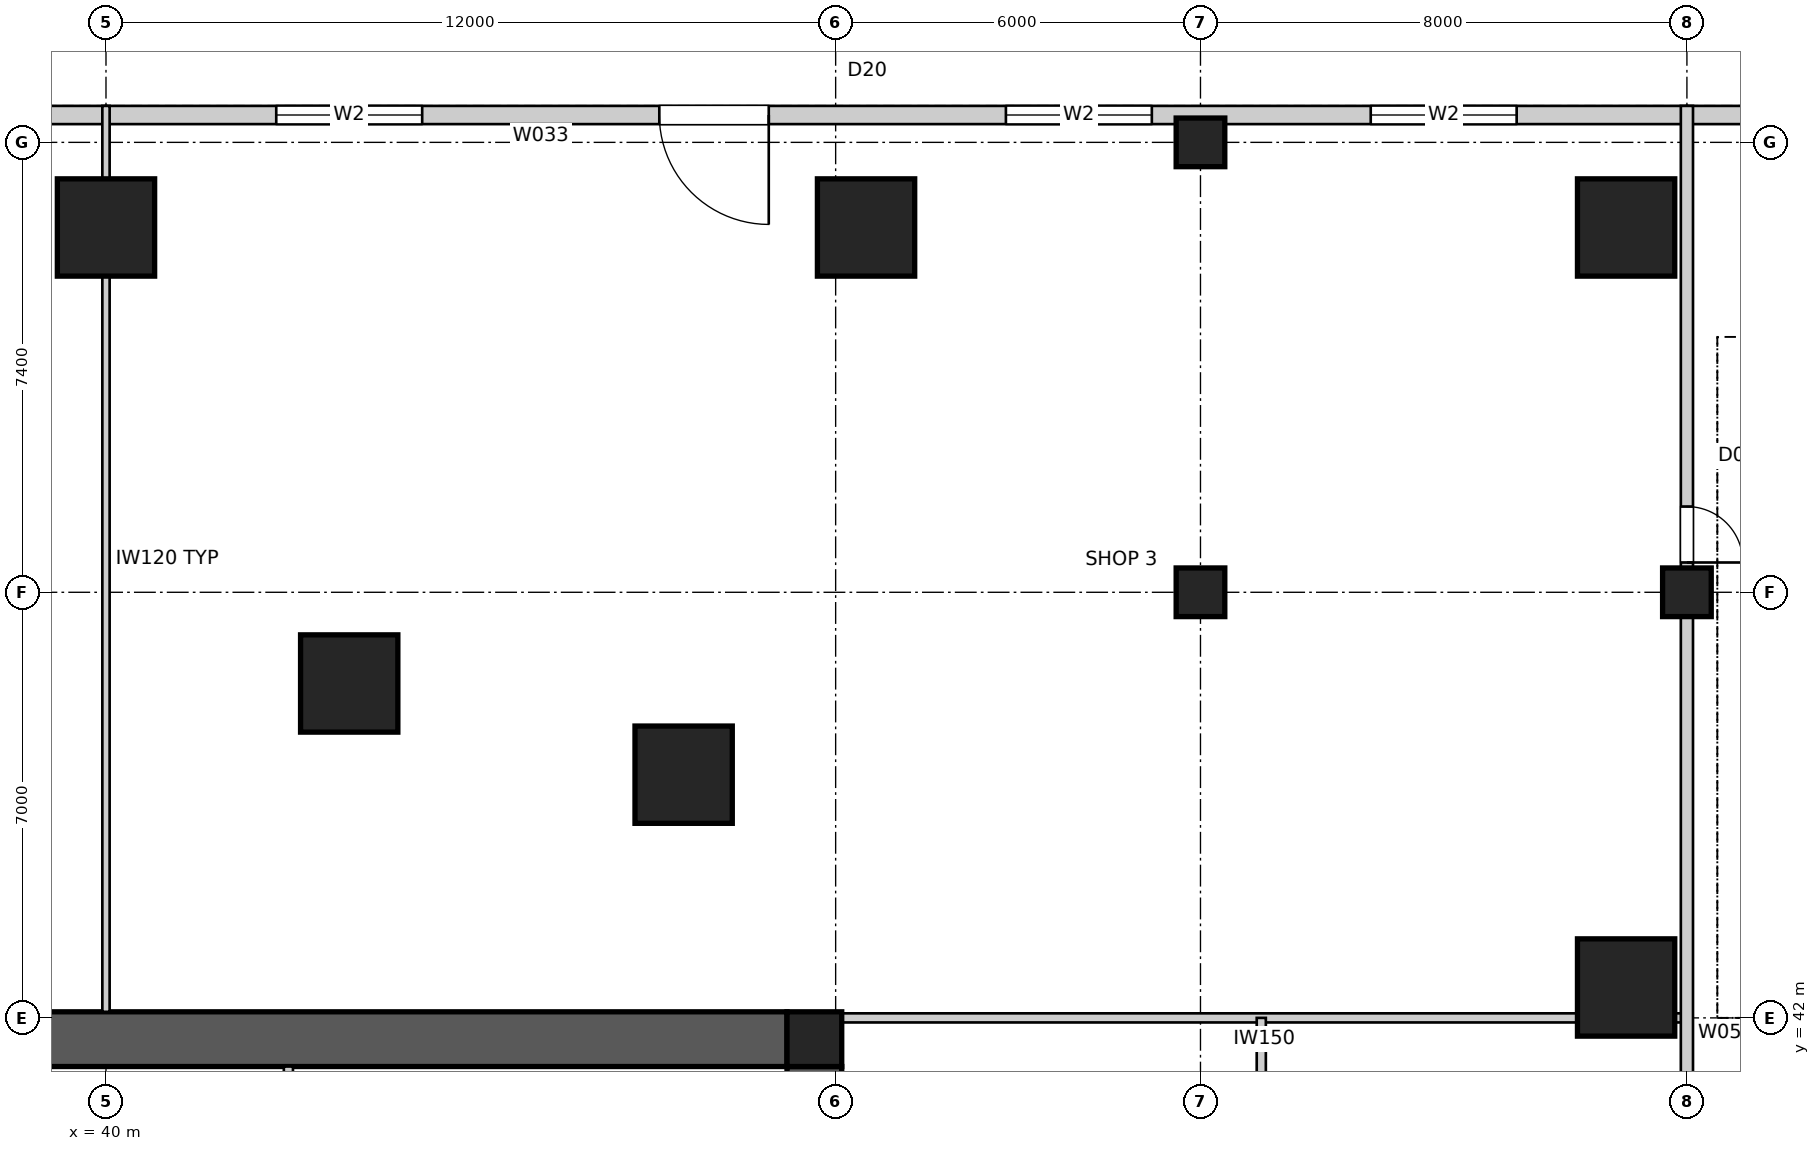
"""IFC4 building model, lengths in metres.
Left out: names, types, materials, properties, quantities, classifications, styles, units other than length and angle.
Written with IfcOpenShell. Run it as: python <this file> out.ifc"""

import sys

from ifc_helpers import new_model, si_unit, direction, frame, frame_2d, origin, origin_2d, place, context, subcontext, project, spatial, polyline, rectangle, outline, extrude, element, fill, save


model = new_model("IFC4")
c1 = context("Model", 3, precision=1e-05, world=origin(), true_north=direction((0.0, 1.0)))
c2 = subcontext(c1, "Body", "Model", "MODEL_VIEW")
j1 = project(units=[si_unit("LENGTHUNIT", "METRE"), si_unit("PLANEANGLEUNIT", "RADIAN")], contexts=[c1])
p1 = place(None, origin())
s1 = spatial("IfcSite", under=j1, at=p1, CompositionType="ELEMENT")
p2 = place(p1, origin())
s2 = spatial("IfcBuilding", under=s1, at=p2, CompositionType="ELEMENT")
p3 = place(p2, origin())
s3 = spatial("IfcBuildingStorey", under=s2, at=p3, CompositionType="ELEMENT", Elevation=0.0)
p4 = place(p3, frame((28.8, 41.65, 0.0), z_axis=(0.0, 0.0, 1.0), x_axis=(1.0, 0.0, 0.0)))
e1 = element("IfcWall", 1, at=p4, inside=s3, PredefinedType="SHEAR", context=c2, shape_type="SweptSolid", body=[
    extrude(outline(polyline([(0.0, -0.45), (22.4, -0.45), (22.4, -0.025), (22.85, -0.025), (22.85, 0.025), (22.4, 0.025), (22.4, 0.45), (0.0, 0.45), (0.0, 0.025), (-0.45, 0.025), (-0.45, -0.025), (0.0, -0.025), (0.0, -0.45)])), origin(), (0.0, 0.0, 1.0), 6.0),
])
p5 = place(p3, frame((51.65, 18.8, 0.0), z_axis=(0.0, 0.0, 1.0), x_axis=(0.0, 1.0, 0.0)))
e2 = element("IfcWall", 2, at=p5, inside=s3, PredefinedType="SHEAR", context=c2, shape_type="SweptSolid", body=[
    extrude(outline(polyline([(0.0, -0.45), (22.4, -0.45), (22.4, -0.025), (22.85, -0.025), (22.85, 0.025), (22.4, 0.025), (22.4, 0.45), (0.0, 0.45), (0.0, 0.025), (-0.45, 0.025), (-0.45, -0.025), (0.0, -0.025), (0.0, -0.45)])), origin(), (0.0, 0.0, 1.0), 6.0),
])
p6 = place(p5, frame((11.14, 0.0, 0.0)))
e3 = element("IfcOpeningElement", 3, at=p6, cuts=e2, PredefinedType="OPENING", context=c2, shape_type="SweptSolid", body=[
    extrude(rectangle(XDim=1.02, YDim=2.4, at=frame_2d((0.51, 1.2))), frame((0.0, 0.46, 0.0), z_axis=(0.0, -1.0, 0.0), x_axis=(1.0, 0.0, 0.0)), (0.0, 0.0, 1.0), 0.92),
])
p7 = place(p3, frame((51.65, 41.65, 0.0), z_axis=(0.0, 0.0, 1.0), x_axis=(1.0, 0.0, 0.0)))
e4 = element("IfcColumn", 4, at=p7, inside=s3, PredefinedType="COLUMN", context=c2, shape_type="SweptSolid", body=[
    extrude(rectangle(XDim=0.9, YDim=0.9, at=origin_2d()), origin(), (0.0, 0.0, 1.0), 6.0),
])
for number, where, z_axis, x_axis in (
    (5, (65.0, 42.5, 0.0), (0.0, 0.0, 1.0), (1.0, 0.0, 0.0)),
    (6, (65.0, 55.0, 0.0), (0.0, 0.0, 1.0), (1.0, 0.0, 0.0)),
    (7, (52.5, 55.0, 0.0), (0.0, 0.0, 1.0), (1.0, 0.0, 0.0)),
    (8, (40.0, 55.0, 0.0), (0.0, 0.0, 1.0), (1.0, 0.0, 0.0)),
):
    element("IfcColumn", number, at=place(p3, frame(where, z_axis=z_axis, x_axis=x_axis)), inside=s3, PredefinedType="COLUMN", context=c2, shape_type="SweptSolid", body=[
        extrude(rectangle(XDim=1.6, YDim=1.6, at=origin_2d()), origin(), (0.0, 0.0, 1.0), 6.0),
    ])
for number, where, z_axis, x_axis in (
    (9, (58.0, 49.0, 0.0), (0.0, 0.0, 1.0), (1.0, 0.0, 0.0)),
    (10, (58.0, 56.4, 0.0), (0.0, 0.0, 1.0), (1.0, 0.0, 0.0)),
    (11, (66.0, 49.0, 0.0), (0.0, 0.0, 1.0), (1.0, 0.0, 0.0)),
):
    element("IfcColumn", number, at=place(p3, frame(where, z_axis=z_axis, x_axis=x_axis)), inside=s3, PredefinedType="COLUMN", context=c2, shape_type="SweptSolid", body=[
        extrude(rectangle(XDim=0.8, YDim=0.8, at=origin_2d()), origin(), (0.0, 0.0, 1.0), 6.0),
    ])
for number, where, z_axis, x_axis in (
    (12, (49.5, 46.0, 0.0), (0.0, 0.0, 1.0), (1.0, 0.0, 0.0)),
    (13, (44.0, 47.5, 0.0), (0.0, 0.0, 1.0), (1.0, 0.0, 0.0)),
):
    element("IfcColumn", number, at=place(p3, frame(where, z_axis=z_axis, x_axis=x_axis)), inside=s3, PredefinedType="COLUMN", context=c2, shape_type="SweptSolid", body=[
        extrude(rectangle(XDim=1.6, YDim=1.6, at=origin_2d()), origin(), (0.0, 0.0, 1.0), 6.0),
    ])
p8 = place(p3, frame((78.0, 56.85, 0.0), z_axis=(0.0, 0.0, 1.0), x_axis=(-1.0, 0.0, 0.0)))
e14 = element("IfcWall", 14, at=p8, inside=s3, PredefinedType="SOLIDWALL", context=c2, shape_type="SweptSolid", body=[
    extrude(rectangle(XDim=12.0, YDim=0.3, at=frame_2d((6.0, 0.0))), origin(), (0.0, 0.0, 1.0), 5.65),
])
p9 = place(p8, frame((3.0, 0.0, 0.0)))
e15 = element("IfcOpeningElement", 15, at=p9, cuts=e14, PredefinedType="OPENING", context=c2, shape_type="SweptSolid", body=[
    extrude(rectangle(XDim=6.0, YDim=4.5, at=frame_2d((3.0, 2.25))), frame((0.0, 0.16, 0.0), z_axis=(0.0, -1.0, 0.0), x_axis=(1.0, 0.0, 0.0)), (0.0, 0.0, 1.0), 0.32),
])
p10 = place(p3, frame((66.0, 56.85, 0.0), z_axis=(0.0, 0.0, 1.0), x_axis=(-1.0, 0.0, 0.0)))
e16 = element("IfcWall", 16, at=p10, inside=s3, PredefinedType="SOLIDWALL", context=c2, shape_type="SweptSolid", body=[
    extrude(rectangle(XDim=26.0, YDim=0.3, at=frame_2d((13.0, 0.0))), origin(), (0.0, 0.0, 1.0), 5.65),
])
p11 = place(p10, frame((2.8, 0.0, 0.6)))
e17 = element("IfcOpeningElement", 17, at=p11, cuts=e16, PredefinedType="OPENING", context=c2, shape_type="SweptSolid", body=[
    extrude(rectangle(XDim=2.4, YDim=3.6, at=frame_2d((1.2, 1.8))), frame((0.0, 0.16, 0.0), z_axis=(0.0, -1.0, 0.0), x_axis=(1.0, 0.0, 0.0)), (0.0, 0.0, 1.0), 0.32),
])
p12 = place(p10, frame((8.8, 0.0, 0.6)))
e18 = element("IfcOpeningElement", 18, at=p12, cuts=e16, PredefinedType="OPENING", context=c2, shape_type="SweptSolid", body=[
    extrude(rectangle(XDim=2.4, YDim=3.6, at=frame_2d((1.2, 1.8))), frame((0.0, 0.16, 0.0), z_axis=(0.0, -1.0, 0.0), x_axis=(1.0, 0.0, 0.0)), (0.0, 0.0, 1.0), 0.32),
])
p13 = place(p10, frame((15.1, 0.0, 0.0)))
e19 = element("IfcOpeningElement", 19, at=p13, cuts=e16, PredefinedType="OPENING", context=c2, shape_type="SweptSolid", body=[
    extrude(rectangle(XDim=1.8, YDim=2.7, at=frame_2d((0.9, 1.35))), frame((0.0, 0.16, 0.0), z_axis=(0.0, -1.0, 0.0), x_axis=(1.0, 0.0, 0.0)), (0.0, 0.0, 1.0), 0.32),
])
p14 = place(p10, frame((20.8, 0.0, 0.6)))
e20 = element("IfcOpeningElement", 20, at=p14, cuts=e16, PredefinedType="OPENING", context=c2, shape_type="SweptSolid", body=[
    extrude(rectangle(XDim=2.4, YDim=3.6, at=frame_2d((1.2, 1.8))), frame((0.0, 0.16, 0.0), z_axis=(0.0, -1.0, 0.0), x_axis=(1.0, 0.0, 0.0)), (0.0, 0.0, 1.0), 0.32),
])
p15 = place(p3, frame((40.0, 56.85, 0.0), z_axis=(0.0, 0.0, 1.0), x_axis=(-1.0, 0.0, 0.0)))
e21 = element("IfcWall", 21, at=p15, inside=s3, PredefinedType="SOLIDWALL", context=c2, shape_type="SweptSolid", body=[
    extrude(rectangle(XDim=26.0, YDim=0.3, at=frame_2d((13.0, 0.0))), origin(), (0.0, 0.0, 1.0), 5.65),
])
p16 = place(p15, frame((2.8, 0.0, 0.6)))
e22 = element("IfcOpeningElement", 22, at=p16, cuts=e21, PredefinedType="OPENING", context=c2, shape_type="SweptSolid", body=[
    extrude(rectangle(XDim=2.4, YDim=3.6, at=frame_2d((1.2, 1.8))), frame((0.0, 0.16, 0.0), z_axis=(0.0, -1.0, 0.0), x_axis=(1.0, 0.0, 0.0)), (0.0, 0.0, 1.0), 0.32),
])
p17 = place(p15, frame((8.8, 0.0, 0.6)))
e23 = element("IfcOpeningElement", 23, at=p17, cuts=e21, PredefinedType="OPENING", context=c2, shape_type="SweptSolid", body=[
    extrude(rectangle(XDim=2.4, YDim=3.6, at=frame_2d((1.2, 1.8))), frame((0.0, 0.16, 0.0), z_axis=(0.0, -1.0, 0.0), x_axis=(1.0, 0.0, 0.0)), (0.0, 0.0, 1.0), 0.32),
])
p18 = place(p15, frame((15.1, 0.0, 0.0)))
e24 = element("IfcOpeningElement", 24, at=p18, cuts=e21, PredefinedType="OPENING", context=c2, shape_type="SweptSolid", body=[
    extrude(rectangle(XDim=1.8, YDim=2.7, at=frame_2d((0.9, 1.35))), frame((0.0, 0.16, 0.0), z_axis=(0.0, -1.0, 0.0), x_axis=(1.0, 0.0, 0.0)), (0.0, 0.0, 1.0), 0.32),
])
p19 = place(p15, frame((20.8, 0.0, 0.6)))
e25 = element("IfcOpeningElement", 25, at=p19, cuts=e21, PredefinedType="OPENING", context=c2, shape_type="SweptSolid", body=[
    extrude(rectangle(XDim=2.4, YDim=3.6, at=frame_2d((1.2, 1.8))), frame((0.0, 0.16, 0.0), z_axis=(0.0, -1.0, 0.0), x_axis=(1.0, 0.0, 0.0)), (0.0, 0.0, 1.0), 0.32),
])
p20 = place(p3, frame((43.0, 41.2, 0.0), z_axis=(0.0, 0.0, 1.0), x_axis=(0.0, -1.0, 0.0)))
e26 = element("IfcWall", 26, at=p20, inside=s3, PredefinedType="SOLIDWALL", context=c2, shape_type="SweptSolid", body=[
    extrude(rectangle(XDim=5.9, YDim=0.15, at=frame_2d((2.95, 0.0))), origin(), (0.0, 0.0, 1.0), 5.65),
])
p21 = place(p3, frame((40.0, 57.0, 0.0), z_axis=(0.0, 0.0, 1.0), x_axis=(0.0, -1.0, 0.0)))
e27 = element("IfcWall", 27, at=p21, inside=s3, PredefinedType="PARTITIONING", context=c2, shape_type="SweptSolid", body=[
    extrude(rectangle(XDim=14.9, YDim=0.12, at=frame_2d((7.45, 0.0))), origin(), (0.0, 0.0, 1.0), 5.65),
])
p22 = place(p3, frame((66.0, 42.0, 0.0), z_axis=(0.0, 0.0, 1.0), x_axis=(-1.0, 0.0, 0.0)))
e28 = element("IfcWall", 28, at=p22, inside=s3, PredefinedType="SOLIDWALL", context=c2, shape_type="SweptSolid", body=[
    extrude(rectangle(XDim=13.9, YDim=0.15, at=frame_2d((6.95, 0.0))), origin(), (0.0, 0.0, 1.0), 5.65),
])
p23 = place(p3, frame((66.0, 57.0, 0.0), z_axis=(0.0, 0.0, 1.0), x_axis=(0.0, -1.0, 0.0)))
e29 = element("IfcWall", 29, at=p23, inside=s3, PredefinedType="PARTITIONING", context=c2, shape_type="SweptSolid", body=[
    extrude(rectangle(XDim=23.0, YDim=0.2, at=frame_2d((11.5, 0.0))), origin(), (0.0, 0.0, 1.0), 5.65),
])
p24 = place(p23, frame((6.59, 0.0, 0.0)))
e30 = element("IfcOpeningElement", 30, at=p24, cuts=e29, PredefinedType="OPENING", context=c2, shape_type="SweptSolid", body=[
    extrude(rectangle(XDim=0.92, YDim=2.34, at=frame_2d((0.46, 1.17))), frame((0.0, 0.11, 0.0), z_axis=(0.0, -1.0, 0.0), x_axis=(1.0, 0.0, 0.0)), (0.0, 0.0, 1.0), 0.22),
])
p25 = place(p3, frame((59.0, 42.0, 0.0), z_axis=(0.0, 0.0, 1.0), x_axis=(0.0, -1.0, 0.0)))
e31 = element("IfcWall", 31, at=p25, inside=s3, PredefinedType="SOLIDWALL", context=c2, shape_type="SweptSolid", body=[
    extrude(rectangle(XDim=8.0, YDim=0.15, at=frame_2d((4.0, 0.0))), origin(), (0.0, 0.0, 1.0), 5.65),
])
p26 = place(p11, origin())
e32 = element("IfcWindow", 32, at=p26, inside=s3, PartitioningType="SINGLE_PANEL", PredefinedType="WINDOW", context=c2, shape_type="SweptSolid", body=[
    extrude(rectangle(XDim=2.4, YDim=3.6, at=frame_2d((1.2, 1.8))), frame((0.0, 0.03, 0.0), z_axis=(0.0, -1.0, 0.0), x_axis=(1.0, 0.0, 0.0)), (0.0, 0.0, 1.0), 0.06),
])
fill(e17, e32)
p27 = place(p12, origin())
e33 = element("IfcWindow", 33, at=p27, inside=s3, PartitioningType="SINGLE_PANEL", PredefinedType="WINDOW", context=c2, shape_type="SweptSolid", body=[
    extrude(rectangle(XDim=2.4, YDim=3.6, at=frame_2d((1.2, 1.8))), frame((0.0, 0.03, 0.0), z_axis=(0.0, -1.0, 0.0), x_axis=(1.0, 0.0, 0.0)), (0.0, 0.0, 1.0), 0.06),
])
fill(e18, e33)
p28 = place(p13, origin())
e34 = element("IfcDoor", 34, at=p28, inside=s3, OperationType="DOUBLE_DOOR_DOUBLE_SWING", PredefinedType="DOOR", context=c2, shape_type="SweptSolid", body=[
    extrude(rectangle(XDim=1.8, YDim=2.7, at=frame_2d((0.9, 1.35))), frame((0.0, 0.025, 0.0), z_axis=(0.0, -1.0, 0.0), x_axis=(1.0, 0.0, 0.0)), (0.0, 0.0, 1.0), 0.05),
])
fill(e19, e34)
p29 = place(p14, origin())
e35 = element("IfcWindow", 35, at=p29, inside=s3, PartitioningType="SINGLE_PANEL", PredefinedType="WINDOW", context=c2, shape_type="SweptSolid", body=[
    extrude(rectangle(XDim=2.4, YDim=3.6, at=frame_2d((1.2, 1.8))), frame((0.0, 0.03, 0.0), z_axis=(0.0, -1.0, 0.0), x_axis=(1.0, 0.0, 0.0)), (0.0, 0.0, 1.0), 0.06),
])
fill(e20, e35)
p30 = place(p24, origin())
e36 = element("IfcDoor", 36, at=p30, inside=s3, OperationType="SINGLE_SWING_RIGHT", PredefinedType="DOOR", context=c2, shape_type="SweptSolid", body=[
    extrude(rectangle(XDim=0.92, YDim=2.34, at=frame_2d((0.46, 1.17))), frame((0.0, 0.025, 0.0), z_axis=(0.0, -1.0, 0.0), x_axis=(1.0, 0.0, 0.0)), (0.0, 0.0, 1.0), 0.05),
])
fill(e30, e36)
save(model, sys.argv[1])
